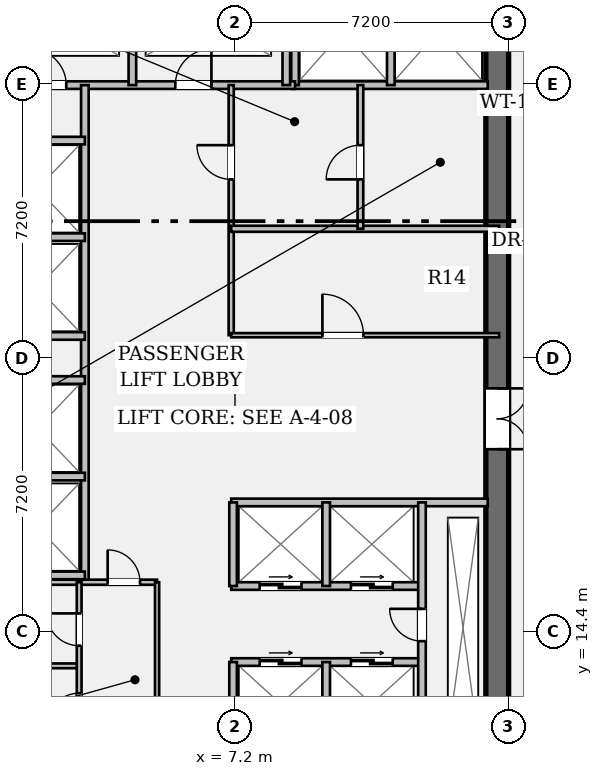
"""IFC4 building model, lengths in metres.
Left out: names, types, materials, properties, quantities, classifications, styles, units other than length and angle.
Written with IfcOpenShell. Run it as: python <this file> out.ifc"""

import sys

from ifc_helpers import new_model, si_unit, direction, frame, frame_2d, origin, place, context, subcontext, project, spatial, rectangle, extrude, element, fill, save


model = new_model("IFC4")
c1 = context("Model", 3, precision=1e-05, world=origin(), true_north=direction((0.0, 1.0)))
c2 = subcontext(c1, "Body", "Model", "MODEL_VIEW")
j1 = project(units=[si_unit("LENGTHUNIT", "METRE"), si_unit("PLANEANGLEUNIT", "RADIAN")], contexts=[c1])
p1 = place(None, origin())
s1 = spatial("IfcSite", under=j1, at=p1, CompositionType="ELEMENT")
p2 = place(p1, origin())
s2 = spatial("IfcBuilding", under=s1, at=p2, CompositionType="ELEMENT")
p3 = place(p2, frame((0.0, 0.0, 133.0)))
s3 = spatial("IfcBuildingStorey", under=s2, at=p3, CompositionType="ELEMENT", Elevation=133.0)
p4 = place(p3, frame((14.1, 35.4, 0.0), z_axis=(0.0, 0.0, 1.0), x_axis=(0.0, -1.0, 0.0)))
e1 = element("IfcWall", 1, at=p4, inside=s3, PredefinedType="SHEAR", context=c2, shape_type="SweptSolid", body=[
    extrude(rectangle(XDim=27.6, YDim=0.6, at=frame_2d((13.8, 0.0))), origin(), (0.0, 0.0, 1.0), 3.58),
])
p5 = place(p4, frame((1.3, 0.0, 0.0)))
e2 = element("IfcOpeningElement", 2, at=p5, cuts=e1, PredefinedType="OPENING", context=c2, shape_type="SweptSolid", body=[
    extrude(rectangle(XDim=1.2, YDim=2.15, at=frame_2d((0.6, 1.075))), frame((0.0, 0.312, 0.0), z_axis=(0.0, -1.0, 0.0), x_axis=(1.0, 0.0, 0.0)), (0.0, 0.0, 1.0), 0.624),
])
p6 = place(p4, frame((25.25, 0.0, 0.0)))
e3 = element("IfcOpeningElement", 3, at=p6, cuts=e1, PredefinedType="OPENING", context=c2, shape_type="SweptSolid", body=[
    extrude(rectangle(XDim=1.2, YDim=2.15, at=frame_2d((0.6, 1.075))), frame((0.0, 0.312, 0.0), z_axis=(0.0, -1.0, 0.0), x_axis=(1.0, 0.0, 0.0)), (0.0, 0.0, 1.0), 0.624),
])
p7 = place(p4, frame((14.6, 0.0, 0.0)))
e4 = element("IfcOpeningElement", 4, at=p7, cuts=e1, PredefinedType="OPENING", context=c2, shape_type="SweptSolid", body=[
    extrude(rectangle(XDim=1.6, YDim=2.2, at=frame_2d((0.8, 1.1))), frame((0.0, 0.312, 0.0), z_axis=(0.0, -1.0, 0.0), x_axis=(1.0, 0.0, 0.0)), (0.0, 0.0, 1.0), 0.624),
])
p8 = place(p3, frame((8.7, 28.78, 0.0), z_axis=(0.0, 0.0, 1.0), x_axis=(1.0, 0.0, 0.0)))
e5 = element("IfcWall", 5, at=p8, inside=s3, PredefinedType="PARTITIONING", context=c2, shape_type="SweptSolid", body=[
    extrude(rectangle(XDim=5.15, YDim=0.2, at=frame_2d((2.575, 0.0))), origin(), (0.0, 0.0, 1.0), 3.58),
])
for number, where, z_axis, x_axis in (
    (6, (8.78, 28.78, 0.0), (0.0, 0.0, 1.0), (0.0, 1.0, 0.0)),
    (7, (11.3, 28.78, 0.0), (0.0, 0.0, 1.0), (0.0, 1.0, 0.0)),
):
    element("IfcWall", number, at=place(p3, frame(where, z_axis=z_axis, x_axis=x_axis)), inside=s3, PredefinedType="PARTITIONING", context=c2, shape_type="SweptSolid", body=[
        extrude(rectangle(XDim=3.1, YDim=0.2, at=frame_2d((1.55, 0.0))), origin(), (0.0, 0.0, 1.0), 3.58),
    ])
p9 = place(p3, frame((0.6, 28.78, 0.0), z_axis=(0.0, 0.0, 1.0), x_axis=(1.0, 0.0, 0.0)))
e8 = element("IfcWall", 8, at=p9, inside=s3, PredefinedType="PARTITIONING", context=c2, shape_type="SweptSolid", body=[
    extrude(rectangle(XDim=8.18, YDim=0.2, at=frame_2d((4.09, 0.0))), origin(), (0.0, 0.0, 1.0), 3.58),
])
p10 = place(p9, frame((1.21, 0.0, 0.0)))
e9 = element("IfcOpeningElement", 9, at=p10, cuts=e8, PredefinedType="OPENING", context=c2, shape_type="SweptSolid", body=[
    extrude(rectangle(XDim=0.95, YDim=2.15, at=frame_2d((0.475, 1.075))), frame((0.0, 0.112, 0.0), z_axis=(0.0, -1.0, 0.0), x_axis=(1.0, 0.0, 0.0)), (0.0, 0.0, 1.0), 0.224),
])
p11 = place(p9, frame((5.03, 0.0, 0.0)))
e10 = element("IfcOpeningElement", 10, at=p11, cuts=e8, PredefinedType="OPENING", context=c2, shape_type="SweptSolid", body=[
    extrude(rectangle(XDim=0.95, YDim=2.15, at=frame_2d((0.475, 1.075))), frame((0.0, 0.112, 0.0), z_axis=(0.0, -1.0, 0.0), x_axis=(1.0, 0.0, 0.0)), (0.0, 0.0, 1.0), 0.224),
])
for number, where, z_axis, x_axis in (
    (11, (4.5, 28.78, 0.0), (0.0, 0.0, 1.0), (0.0, 1.0, 0.0)),
    (12, (8.55, 28.78, 0.0), (0.0, 0.0, 1.0), (0.0, 1.0, 0.0)),
):
    element("IfcWall", number, at=place(p3, frame(where, z_axis=z_axis, x_axis=x_axis)), inside=s3, PredefinedType="PARTITIONING", context=c2, shape_type="SweptSolid", body=[
        extrude(rectangle(XDim=2.94, YDim=0.2, at=frame_2d((1.47, 0.0))), origin(), (0.0, 0.0, 1.0), 3.58),
    ])
p12 = place(p3, frame((3.25, 15.7, 0.0), z_axis=(0.0, 0.0, 1.0), x_axis=(0.0, 1.0, 0.0)))
e13 = element("IfcWall", 13, at=p12, inside=s3, PredefinedType="PARTITIONING", context=c2, shape_type="SweptSolid", body=[
    extrude(rectangle(XDim=13.08, YDim=0.2, at=frame_2d((6.54, 0.0))), origin(), (0.0, 0.0, 1.0), 3.58),
])
for number, where, z_axis, x_axis in (
    (14, (0.6, 15.88, 0.0), (0.0, 0.0, 1.0), (1.0, 0.0, 0.0)),
    (15, (0.6, 18.48, 0.0), (0.0, 0.0, 1.0), (1.0, 0.0, 0.0)),
    (16, (0.6, 22.18, 0.0), (0.0, 0.0, 1.0), (1.0, 0.0, 0.0)),
    (17, (0.6, 24.78, 0.0), (0.0, 0.0, 1.0), (1.0, 0.0, 0.0)),
    (18, (0.6, 21.02, 0.0), (0.0, 0.0, 1.0), (1.0, 0.0, 0.0)),
    (19, (0.6, 27.32, 0.0), (0.0, 0.0, 1.0), (1.0, 0.0, 0.0)),
):
    element("IfcWall", number, at=place(p3, frame(where, z_axis=z_axis, x_axis=x_axis)), inside=s3, PredefinedType="PARTITIONING", context=c2, shape_type="SweptSolid", body=[
        extrude(rectangle(XDim=2.65, YDim=0.2, at=frame_2d((1.325, 0.0))), origin(), (0.0, 0.0, 1.0), 3.58),
    ])
p13 = place(p3, frame((7.1, 22.2, 0.0), z_axis=(0.0, 0.0, 1.0), x_axis=(0.0, 1.0, 0.0)))
e20 = element("IfcWall", 20, at=p13, inside=s3, PredefinedType="PARTITIONING", context=c2, shape_type="SweptSolid", body=[
    extrude(rectangle(XDim=6.58, YDim=0.135, at=frame_2d((3.29, 0.0))), origin(), (0.0, 0.0, 1.0), 3.58),
])
p14 = place(p13, frame((4.1, 0.0, 0.0)))
e21 = element("IfcOpeningElement", 21, at=p14, cuts=e20, PredefinedType="OPENING", context=c2, shape_type="SweptSolid", body=[
    extrude(rectangle(XDim=0.9, YDim=2.15, at=frame_2d((0.45, 1.075))), frame((0.0, 0.08, 0.0), z_axis=(0.0, -1.0, 0.0), x_axis=(1.0, 0.0, 0.0)), (0.0, 0.0, 1.0), 0.159),
])
p15 = place(p3, frame((7.1, 22.2, 0.0), z_axis=(0.0, 0.0, 1.0), x_axis=(1.0, 0.0, 0.0)))
e22 = element("IfcWall", 22, at=p15, inside=s3, PredefinedType="PARTITIONING", context=c2, shape_type="SweptSolid", body=[
    extrude(rectangle(XDim=7.05, YDim=0.11, at=frame_2d((3.525, 0.0))), origin(), (0.0, 0.0, 1.0), 3.58),
])
p16 = place(p15, frame((2.4, 0.0, 0.0)))
e23 = element("IfcOpeningElement", 23, at=p16, cuts=e22, PredefinedType="OPENING", context=c2, shape_type="SweptSolid", body=[
    extrude(rectangle(XDim=1.08, YDim=2.15, at=frame_2d((0.54, 1.075))), frame((0.0, 0.067, 0.0), z_axis=(0.0, -1.0, 0.0), x_axis=(1.0, 0.0, 0.0)), (0.0, 0.0, 1.0), 0.134),
])
p17 = place(p3, frame((7.1, 25.0, 0.0), z_axis=(0.0, 0.0, 1.0), x_axis=(1.0, 0.0, 0.0)))
e24 = element("IfcWall", 24, at=p17, inside=s3, PredefinedType="PARTITIONING", context=c2, shape_type="SweptSolid", body=[
    extrude(rectangle(XDim=7.05, YDim=0.16, at=frame_2d((3.525, 0.0))), origin(), (0.0, 0.0, 1.0), 3.58),
])
p18 = place(p3, frame((10.5, 25.0, 0.0), z_axis=(0.0, 0.0, 1.0), x_axis=(0.0, 1.0, 0.0)))
e25 = element("IfcWall", 25, at=p18, inside=s3, PredefinedType="PARTITIONING", context=c2, shape_type="SweptSolid", body=[
    extrude(rectangle(XDim=3.78, YDim=0.15, at=frame_2d((1.89, 0.0))), origin(), (0.0, 0.0, 1.0), 3.58),
])
p19 = place(p18, frame((1.3, 0.0, 0.0)))
e26 = element("IfcOpeningElement", 26, at=p19, cuts=e25, PredefinedType="OPENING", context=c2, shape_type="SweptSolid", body=[
    extrude(rectangle(XDim=0.9, YDim=2.15, at=frame_2d((0.45, 1.075))), frame((0.0, 0.087, 0.0), z_axis=(0.0, -1.0, 0.0), x_axis=(1.0, 0.0, 0.0)), (0.0, 0.0, 1.0), 0.174),
])
p20 = place(p3, frame((7.1, 17.8, 0.0), z_axis=(0.0, 0.0, 1.0), x_axis=(1.0, 0.0, 0.0)))
e27 = element("IfcWall", 27, at=p20, inside=s3, PredefinedType="PARTITIONING", context=c2, shape_type="SweptSolid", body=[
    extrude(rectangle(XDim=6.75, YDim=0.2, at=frame_2d((3.375, 0.0))), origin(), (0.0, 0.0, 1.0), 3.58),
])
p21 = place(p3, frame((7.1, 15.6, 0.0), z_axis=(0.0, 0.0, 1.0), x_axis=(1.0, 0.0, 0.0)))
e28 = element("IfcWall", 28, at=p21, inside=s3, PredefinedType="PARTITIONING", context=c2, shape_type="SweptSolid", body=[
    extrude(rectangle(XDim=5.02, YDim=0.2, at=frame_2d((2.51, 0.0))), origin(), (0.0, 0.0, 1.0), 3.58),
])
p22 = place(p21, frame((0.75, 0.0, 0.0)))
e29 = element("IfcOpeningElement", 29, at=p22, cuts=e28, PredefinedType="OPENING", context=c2, shape_type="SweptSolid", body=[
    extrude(rectangle(XDim=1.1, YDim=2.2, at=frame_2d((0.55, 1.1))), frame((0.0, 0.112, 0.0), z_axis=(0.0, -1.0, 0.0), x_axis=(1.0, 0.0, 0.0)), (0.0, 0.0, 1.0), 0.224),
])
p23 = place(p21, frame((3.15, 0.0, 0.0)))
e30 = element("IfcOpeningElement", 30, at=p23, cuts=e28, PredefinedType="OPENING", context=c2, shape_type="SweptSolid", body=[
    extrude(rectangle(XDim=1.1, YDim=2.2, at=frame_2d((0.55, 1.1))), frame((0.0, 0.112, 0.0), z_axis=(0.0, -1.0, 0.0), x_axis=(1.0, 0.0, 0.0)), (0.0, 0.0, 1.0), 0.224),
])
p24 = place(p3, frame((7.1, 13.6, 0.0), z_axis=(0.0, 0.0, 1.0), x_axis=(1.0, 0.0, 0.0)))
e31 = element("IfcWall", 31, at=p24, inside=s3, PredefinedType="PARTITIONING", context=c2, shape_type="SweptSolid", body=[
    extrude(rectangle(XDim=5.02, YDim=0.2, at=frame_2d((2.51, 0.0))), origin(), (0.0, 0.0, 1.0), 3.58),
])
p25 = place(p24, frame((0.75, 0.0, 0.0)))
e32 = element("IfcOpeningElement", 32, at=p25, cuts=e31, PredefinedType="OPENING", context=c2, shape_type="SweptSolid", body=[
    extrude(rectangle(XDim=1.1, YDim=2.2, at=frame_2d((0.55, 1.1))), frame((0.0, 0.112, 0.0), z_axis=(0.0, -1.0, 0.0), x_axis=(1.0, 0.0, 0.0)), (0.0, 0.0, 1.0), 0.224),
])
p26 = place(p24, frame((3.15, 0.0, 0.0)))
e33 = element("IfcOpeningElement", 33, at=p26, cuts=e31, PredefinedType="OPENING", context=c2, shape_type="SweptSolid", body=[
    extrude(rectangle(XDim=1.1, YDim=2.2, at=frame_2d((0.55, 1.1))), frame((0.0, 0.112, 0.0), z_axis=(0.0, -1.0, 0.0), x_axis=(1.0, 0.0, 0.0)), (0.0, 0.0, 1.0), 0.224),
])
p27 = place(p3, frame((7.15, 15.6, 0.0), z_axis=(0.0, 0.0, 1.0), x_axis=(0.0, 1.0, 0.0)))
e34 = element("IfcWall", 34, at=p27, inside=s3, PredefinedType="PARTITIONING", context=c2, shape_type="SweptSolid", body=[
    extrude(rectangle(XDim=2.2, YDim=0.2, at=frame_2d((1.1, 0.0))), origin(), (0.0, 0.0, 1.0), 3.58),
])
p28 = place(p3, frame((7.15, 11.2, 0.0), z_axis=(0.0, 0.0, 1.0), x_axis=(0.0, 1.0, 0.0)))
e35 = element("IfcWall", 35, at=p28, inside=s3, PredefinedType="PARTITIONING", context=c2, shape_type="SweptSolid", body=[
    extrude(rectangle(XDim=2.4, YDim=0.2, at=frame_2d((1.2, 0.0))), origin(), (0.0, 0.0, 1.0), 3.58),
])
p29 = place(p3, frame((9.6, 15.6, 0.0), z_axis=(0.0, 0.0, 1.0), x_axis=(0.0, 1.0, 0.0)))
e36 = element("IfcWall", 36, at=p29, inside=s3, PredefinedType="PARTITIONING", context=c2, shape_type="SweptSolid", body=[
    extrude(rectangle(XDim=2.2, YDim=0.2, at=frame_2d((1.1, 0.0))), origin(), (0.0, 0.0, 1.0), 3.58),
])
p30 = place(p3, frame((9.6, 11.2, 0.0), z_axis=(0.0, 0.0, 1.0), x_axis=(0.0, 1.0, 0.0)))
e37 = element("IfcWall", 37, at=p30, inside=s3, PredefinedType="PARTITIONING", context=c2, shape_type="SweptSolid", body=[
    extrude(rectangle(XDim=2.4, YDim=0.2, at=frame_2d((1.2, 0.0))), origin(), (0.0, 0.0, 1.0), 3.58),
])
p31 = place(p3, frame((12.12, 11.2, 0.0), z_axis=(0.0, 0.0, 1.0), x_axis=(0.0, 1.0, 0.0)))
e38 = element("IfcWall", 38, at=p31, inside=s3, PredefinedType="PARTITIONING", context=c2, shape_type="SweptSolid", body=[
    extrude(rectangle(XDim=6.6, YDim=0.2, at=frame_2d((3.3, 0.0))), origin(), (0.0, 0.0, 1.0), 3.58),
])
p32 = place(p31, frame((2.95, 0.0, 0.0)))
e39 = element("IfcOpeningElement", 39, at=p32, cuts=e38, PredefinedType="OPENING", context=c2, shape_type="SweptSolid", body=[
    extrude(rectangle(XDim=0.85, YDim=2.15, at=frame_2d((0.425, 1.075))), frame((0.0, 0.112, 0.0), z_axis=(0.0, -1.0, 0.0), x_axis=(1.0, 0.0, 0.0)), (0.0, 0.0, 1.0), 0.224),
])
p33 = place(p3, frame((0.6, 15.7, 0.0), z_axis=(0.0, 0.0, 1.0), x_axis=(1.0, 0.0, 0.0)))
e40 = element("IfcWall", 40, at=p33, inside=s3, PredefinedType="PARTITIONING", context=c2, shape_type="SweptSolid", body=[
    extrude(rectangle(XDim=4.55, YDim=0.135, at=frame_2d((2.275, 0.0))), origin(), (0.0, 0.0, 1.0), 3.58),
])
p34 = place(p33, frame((3.25, 0.0, 0.0)))
e41 = element("IfcOpeningElement", 41, at=p34, cuts=e40, PredefinedType="OPENING", context=c2, shape_type="SweptSolid", body=[
    extrude(rectangle(XDim=0.85, YDim=2.15, at=frame_2d((0.425, 1.075))), frame((0.0, 0.08, 0.0), z_axis=(0.0, -1.0, 0.0), x_axis=(1.0, 0.0, 0.0)), (0.0, 0.0, 1.0), 0.159),
])
p35 = place(p3, frame((5.15, 11.28, 0.0), z_axis=(0.0, 0.0, 1.0), x_axis=(0.0, 1.0, 0.0)))
e42 = element("IfcWall", 42, at=p35, inside=s3, PredefinedType="PARTITIONING", context=c2, shape_type="SweptSolid", body=[
    extrude(rectangle(XDim=4.42, YDim=0.11, at=frame_2d((2.21, 0.0))), origin(), (0.0, 0.0, 1.0), 3.58),
])
p36 = place(p3, frame((0.6, 13.5, 0.0), z_axis=(0.0, 0.0, 1.0), x_axis=(1.0, 0.0, 0.0)))
e43 = element("IfcWall", 43, at=p36, inside=s3, PredefinedType="PARTITIONING", context=c2, shape_type="SweptSolid", body=[
    extrude(rectangle(XDim=2.5, YDim=0.125, at=frame_2d((1.25, 0.0))), origin(), (0.0, 0.0, 1.0), 3.58),
])
p37 = place(p3, frame((3.1, 11.28, 0.0), z_axis=(0.0, 0.0, 1.0), x_axis=(0.0, 1.0, 0.0)))
e44 = element("IfcWall", 44, at=p37, inside=s3, PredefinedType="PARTITIONING", context=c2, shape_type="SweptSolid", body=[
    extrude(rectangle(XDim=4.42, YDim=0.125, at=frame_2d((2.21, 0.0))), origin(), (0.0, 0.0, 1.0), 3.58),
])
p38 = place(p37, frame((0.65, 0.0, 0.0)))
e45 = element("IfcOpeningElement", 45, at=p38, cuts=e44, PredefinedType="OPENING", context=c2, shape_type="SweptSolid", body=[
    extrude(rectangle(XDim=0.85, YDim=2.15, at=frame_2d((0.425, 1.075))), frame((0.0, 0.074, 0.0), z_axis=(0.0, -1.0, 0.0), x_axis=(1.0, 0.0, 0.0)), (0.0, 0.0, 1.0), 0.149),
])
p39 = place(p37, frame((2.75, 0.0, 0.0)))
e46 = element("IfcOpeningElement", 46, at=p39, cuts=e44, PredefinedType="OPENING", context=c2, shape_type="SweptSolid", body=[
    extrude(rectangle(XDim=0.85, YDim=2.15, at=frame_2d((0.425, 1.075))), frame((0.0, 0.074, 0.0), z_axis=(0.0, -1.0, 0.0), x_axis=(1.0, 0.0, 0.0)), (0.0, 0.0, 1.0), 0.149),
])
p40 = place(p10, origin())
e47 = element("IfcDoor", 47, at=p40, inside=s3, OperationType="SINGLE_SWING_LEFT", PredefinedType="DOOR", context=c2, shape_type="SweptSolid", body=[
    extrude(rectangle(XDim=0.95, YDim=2.15, at=frame_2d((0.475, 1.075))), frame((0.0, 0.025, 0.0), z_axis=(0.0, -1.0, 0.0), x_axis=(1.0, 0.0, 0.0)), (0.0, 0.0, 1.0), 0.05),
])
fill(e9, e47)
p41 = place(p11, origin())
e48 = element("IfcDoor", 48, at=p41, inside=s3, OperationType="SINGLE_SWING_RIGHT", PredefinedType="DOOR", context=c2, shape_type="SweptSolid", body=[
    extrude(rectangle(XDim=0.95, YDim=2.15, at=frame_2d((0.475, 1.075))), frame((0.0, 0.025, 0.0), z_axis=(0.0, -1.0, 0.0), x_axis=(1.0, 0.0, 0.0)), (0.0, 0.0, 1.0), 0.05),
])
fill(e10, e48)
p42 = place(p7, origin())
e49 = element("IfcDoor", 49, at=p42, inside=s3, OperationType="DOUBLE_DOOR_SINGLE_SWING", PredefinedType="DOOR", context=c2, shape_type="SweptSolid", body=[
    extrude(rectangle(XDim=1.6, YDim=2.2, at=frame_2d((0.8, 1.1))), frame((0.0, 0.025, 0.0), z_axis=(0.0, -1.0, 0.0), x_axis=(1.0, 0.0, 0.0)), (0.0, 0.0, 1.0), 0.05),
])
fill(e4, e49)
p43 = place(p16, origin())
e50 = element("IfcDoor", 50, at=p43, inside=s3, OperationType="SINGLE_SWING_LEFT", PredefinedType="DOOR", context=c2, shape_type="SweptSolid", body=[
    extrude(rectangle(XDim=1.08, YDim=2.15, at=frame_2d((0.54, 1.075))), frame((0.0, 0.025, 0.0), z_axis=(0.0, -1.0, 0.0), x_axis=(1.0, 0.0, 0.0)), (0.0, 0.0, 1.0), 0.05),
])
fill(e23, e50)
p44 = place(p14, origin())
e51 = element("IfcDoor", 51, at=p44, inside=s3, OperationType="SINGLE_SWING_RIGHT", PredefinedType="DOOR", context=c2, shape_type="SweptSolid", body=[
    extrude(rectangle(XDim=0.9, YDim=2.15, at=frame_2d((0.45, 1.075))), frame((0.0, 0.025, 0.0), z_axis=(0.0, -1.0, 0.0), x_axis=(1.0, 0.0, 0.0)), (0.0, 0.0, 1.0), 0.05),
])
fill(e21, e51)
p45 = place(p19, origin())
e52 = element("IfcDoor", 52, at=p45, inside=s3, OperationType="SINGLE_SWING_LEFT", PredefinedType="DOOR", context=c2, shape_type="SweptSolid", body=[
    extrude(rectangle(XDim=0.9, YDim=2.15, at=frame_2d((0.45, 1.075))), frame((0.0, 0.025, 0.0), z_axis=(0.0, -1.0, 0.0), x_axis=(1.0, 0.0, 0.0)), (0.0, 0.0, 1.0), 0.05),
])
fill(e26, e52)
p46 = place(p32, origin())
e53 = element("IfcDoor", 53, at=p46, inside=s3, OperationType="SINGLE_SWING_RIGHT", PredefinedType="DOOR", context=c2, shape_type="SweptSolid", body=[
    extrude(rectangle(XDim=0.85, YDim=2.15, at=frame_2d((0.425, 1.075))), frame((0.0, 0.025, 0.0), z_axis=(0.0, -1.0, 0.0), x_axis=(1.0, 0.0, 0.0)), (0.0, 0.0, 1.0), 0.05),
])
fill(e39, e53)
p47 = place(p22, origin())
e54 = element("IfcDoor", 54, at=p47, inside=s3, OperationType="DOUBLE_DOOR_SLIDING", PredefinedType="DOOR", context=c2, shape_type="SweptSolid", body=[
    extrude(rectangle(XDim=1.1, YDim=2.2, at=frame_2d((0.55, 1.1))), frame((0.0, 0.025, 0.0), z_axis=(0.0, -1.0, 0.0), x_axis=(1.0, 0.0, 0.0)), (0.0, 0.0, 1.0), 0.05),
])
fill(e29, e54)
p48 = place(p23, origin())
e55 = element("IfcDoor", 55, at=p48, inside=s3, OperationType="DOUBLE_DOOR_SLIDING", PredefinedType="DOOR", context=c2, shape_type="SweptSolid", body=[
    extrude(rectangle(XDim=1.1, YDim=2.2, at=frame_2d((0.55, 1.1))), frame((0.0, 0.025, 0.0), z_axis=(0.0, -1.0, 0.0), x_axis=(1.0, 0.0, 0.0)), (0.0, 0.0, 1.0), 0.05),
])
fill(e30, e55)
p49 = place(p25, origin())
e56 = element("IfcDoor", 56, at=p49, inside=s3, OperationType="DOUBLE_DOOR_SLIDING", PredefinedType="DOOR", context=c2, shape_type="SweptSolid", body=[
    extrude(rectangle(XDim=1.1, YDim=2.2, at=frame_2d((0.55, 1.1))), frame((0.0, 0.025, 0.0), z_axis=(0.0, -1.0, 0.0), x_axis=(1.0, 0.0, 0.0)), (0.0, 0.0, 1.0), 0.05),
])
fill(e32, e56)
p50 = place(p26, origin())
e57 = element("IfcDoor", 57, at=p50, inside=s3, OperationType="DOUBLE_DOOR_SLIDING", PredefinedType="DOOR", context=c2, shape_type="SweptSolid", body=[
    extrude(rectangle(XDim=1.1, YDim=2.2, at=frame_2d((0.55, 1.1))), frame((0.0, 0.025, 0.0), z_axis=(0.0, -1.0, 0.0), x_axis=(1.0, 0.0, 0.0)), (0.0, 0.0, 1.0), 0.05),
])
fill(e33, e57)
p51 = place(p34, origin())
e58 = element("IfcDoor", 58, at=p51, inside=s3, OperationType="SINGLE_SWING_LEFT", PredefinedType="DOOR", context=c2, shape_type="SweptSolid", body=[
    extrude(rectangle(XDim=0.85, YDim=2.15, at=frame_2d((0.425, 1.075))), frame((0.0, 0.025, 0.0), z_axis=(0.0, -1.0, 0.0), x_axis=(1.0, 0.0, 0.0)), (0.0, 0.0, 1.0), 0.05),
])
fill(e41, e58)
p52 = place(p38, origin())
e59 = element("IfcDoor", 59, at=p52, inside=s3, OperationType="SINGLE_SWING_LEFT", PredefinedType="DOOR", context=c2, shape_type="SweptSolid", body=[
    extrude(rectangle(XDim=0.85, YDim=2.15, at=frame_2d((0.425, 1.075))), frame((0.0, 0.025, 0.0), z_axis=(0.0, -1.0, 0.0), x_axis=(1.0, 0.0, 0.0)), (0.0, 0.0, 1.0), 0.05),
])
fill(e45, e59)
p53 = place(p39, origin())
e60 = element("IfcDoor", 60, at=p53, inside=s3, OperationType="SINGLE_SWING_RIGHT", PredefinedType="DOOR", context=c2, shape_type="SweptSolid", body=[
    extrude(rectangle(XDim=0.85, YDim=2.15, at=frame_2d((0.425, 1.075))), frame((0.0, 0.025, 0.0), z_axis=(0.0, -1.0, 0.0), x_axis=(1.0, 0.0, 0.0)), (0.0, 0.0, 1.0), 0.05),
])
fill(e46, e60)
save(model, sys.argv[1])
